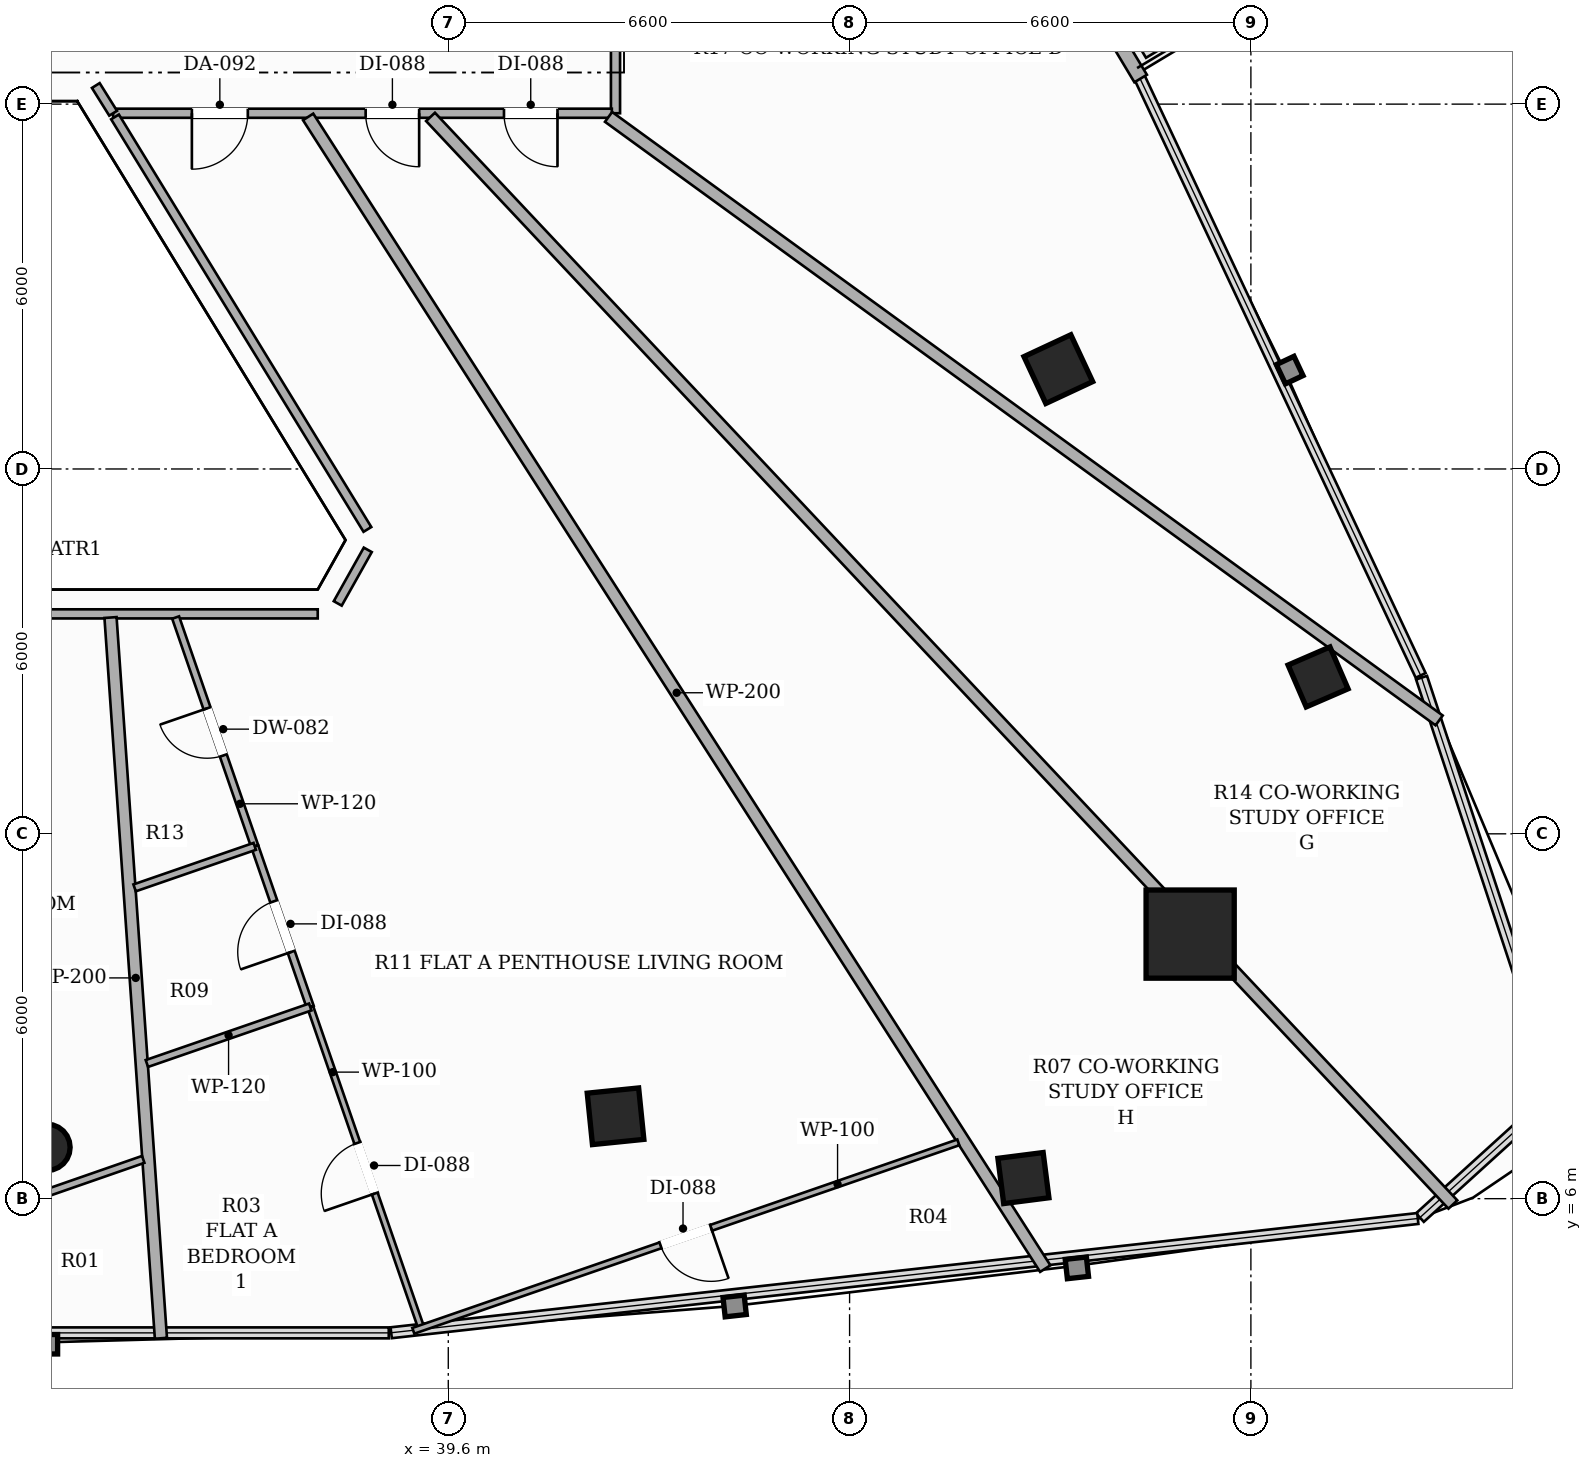
"""IFC4 building model, lengths in metres.
Left out: names, types, materials, properties, quantities, classifications, styles, units other than length and angle.
Written with IfcOpenShell. Run it as: python <this file> out.ifc"""

import sys

from ifc_helpers import new_model, si_unit, direction, frame, frame_2d, origin, origin_2d, place, context, subcontext, project, spatial, rectangle, hollow_rectangle, hollow_circle, extrude, element, fill, save


model = new_model("IFC4")
c1 = context("Model", 3, precision=1e-05, world=origin(), true_north=direction((0.0, 1.0)))
c2 = subcontext(c1, "Body", "Model", "MODEL_VIEW")
j1 = project(units=[si_unit("LENGTHUNIT", "METRE"), si_unit("PLANEANGLEUNIT", "RADIAN")], contexts=[c1])
p1 = place(None, origin())
s1 = spatial("IfcSite", under=j1, at=p1, CompositionType="ELEMENT")
p2 = place(p1, origin())
s2 = spatial("IfcBuilding", under=s1, at=p2, CompositionType="ELEMENT")
p3 = place(p2, frame((0.0, 0.0, 160.55)))
s3 = spatial("IfcBuildingStorey", under=s2, at=p3, CompositionType="ELEMENT", Elevation=160.55)
p4 = place(p3, frame((51.801, 10.351, 0.0), z_axis=(0.0, 0.0, 1.0), x_axis=(1.0, 0.0, 0.0)))
e1 = element("IfcColumn", 1, at=p4, inside=s3, PredefinedType="COLUMN", context=c2, shape_type="SweptSolid", body=[
    extrude(hollow_rectangle(XDim=1.45, YDim=1.45, WallThickness=0.045, at=origin_2d()), origin(), (0.0, 0.0, 1.0), 3.3),
])
p5 = place(p3, frame((33.0, 6.844, 0.0), z_axis=(0.0, 0.0, 1.0), x_axis=(1.0, 0.0, 0.0)))
e2 = element("IfcColumn", 2, at=p5, inside=s3, PredefinedType="COLUMN", context=c2, shape_type="SweptSolid", body=[
    extrude(hollow_circle(Radius=0.381, WallThickness=0.022, at=origin_2d()), origin(), (0.0, 0.0, 1.0), 3.3),
])
for number, where, z_axis, x_axis in (
    (3, (42.351, 7.355, 0.0), (0.0, 0.0, 1.0), (0.995, 0.101, 0.0)),
    (4, (49.633, 19.642, 0.0), (0.0, 0.0, 1.0), (-0.423, 0.906, 0.0)),
):
    element("IfcColumn", number, at=place(p3, frame(where, z_axis=z_axis, x_axis=x_axis)), inside=s3, PredefinedType="COLUMN", context=c2, shape_type="SweptSolid", body=[
        extrude(hollow_rectangle(XDim=0.85, YDim=0.85, WallThickness=0.028, at=origin_2d()), origin(), (0.0, 0.0, 1.0), 3.3),
    ])
for number, where, z_axis, x_axis in (
    (5, (49.059, 6.339, 0.0), (0.0, 0.0, 1.0), (0.992, 0.127, 0.0)),
    (6, (53.905, 14.58, 0.0), (0.0, 0.0, 1.0), (-0.397, 0.918, 0.0)),
):
    element("IfcColumn", number, at=place(p3, frame(where, z_axis=z_axis, x_axis=x_axis)), inside=s3, PredefinedType="COLUMN", context=c2, shape_type="SweptSolid", body=[
        extrude(hollow_rectangle(XDim=0.75, YDim=0.75, WallThickness=0.025, at=origin_2d()), origin(), (0.0, 0.0, 1.0), 3.3),
    ])
p6 = place(p3, frame((50.987, 24.421, 0.0), z_axis=(0.0, 0.0, 1.0), x_axis=(-0.514334017412, 0.85758994778, 0.0)))
e7 = element("IfcWall", 7, at=p6, inside=s3, PredefinedType="SOLIDWALL", context=c2, shape_type="SweptSolid", body=[
    extrude(rectangle(XDim=11.1, YDim=0.24, at=frame_2d((5.55, 0.0))), origin(), (0.0, 0.0, 1.0), 2.624),
])
p7 = place(p6, frame((8.602, 0.0, 0.0)))
e8 = element("IfcOpeningElement", 8, at=p7, cuts=e7, PredefinedType="OPENING", context=c2, shape_type="SweptSolid", body=[
    extrude(rectangle(XDim=1.8, YDim=2.2, at=frame_2d((0.9, 1.1))), frame((0.0, 0.13, 0.0), z_axis=(0.0, -1.0, 0.0), x_axis=(1.0, 0.0, 0.0)), (0.0, 0.0, 1.0), 0.26),
])
p8 = place(p3, frame((42.35, 28.34, 0.0), z_axis=(0.0, 0.0, 1.0), x_axis=(0.0, -1.0, 0.0)))
e9 = element("IfcWall", 9, at=p8, inside=s3, PredefinedType="PARTITIONING", context=c2, shape_type="SweptSolid", body=[
    extrude(rectangle(XDim=4.49, YDim=0.15, at=frame_2d((2.245, 0.0))), origin(), (0.0, 0.0, 1.0), 2.721),
])
p9 = place(p8, frame((1.805, 0.0, 0.0)))
e10 = element("IfcOpeningElement", 10, at=p9, cuts=e9, PredefinedType="OPENING", context=c2, shape_type="SweptSolid", body=[
    extrude(rectangle(XDim=0.88, YDim=2.1, at=frame_2d((0.44, 1.05))), frame((0.0, 0.085, 0.0), z_axis=(0.0, -1.0, 0.0), x_axis=(1.0, 0.0, 0.0)), (0.0, 0.0, 1.0), 0.17),
])
p10 = place(p3, frame((42.29, 23.85, 0.0), z_axis=(0.0, 0.0, 1.0), x_axis=(-1.0, 0.0, 0.0)))
e11 = element("IfcWall", 11, at=p10, inside=s3, PredefinedType="PARTITIONING", context=c2, shape_type="SweptSolid", body=[
    extrude(rectangle(XDim=8.202, YDim=0.15, at=frame_2d((4.101, 0.0))), origin(), (0.0, 0.0, 1.0), 2.492),
])
p11 = place(p10, frame((5.987, 0.0, 0.0)))
e12 = element("IfcOpeningElement", 12, at=p11, cuts=e11, PredefinedType="OPENING", context=c2, shape_type="SweptSolid", body=[
    extrude(rectangle(XDim=0.92, YDim=2.15, at=frame_2d((0.46, 1.075))), frame((0.0, 0.085, 0.0), z_axis=(0.0, -1.0, 0.0), x_axis=(1.0, 0.0, 0.0)), (0.0, 0.0, 1.0), 0.17),
])
p12 = place(p10, frame((0.894, 0.0, 0.0)))
e13 = element("IfcOpeningElement", 13, at=p12, cuts=e11, PredefinedType="OPENING", context=c2, shape_type="SweptSolid", body=[
    extrude(rectangle(XDim=0.88, YDim=2.1, at=frame_2d((0.44, 1.05))), frame((0.0, 0.085, 0.0), z_axis=(0.0, -1.0, 0.0), x_axis=(1.0, 0.0, 0.0)), (0.0, 0.0, 1.0), 0.17),
])
p13 = place(p10, frame((3.169, 0.0, 0.0)))
e14 = element("IfcOpeningElement", 14, at=p13, cuts=e11, PredefinedType="OPENING", context=c2, shape_type="SweptSolid", body=[
    extrude(rectangle(XDim=0.88, YDim=2.1, at=frame_2d((0.44, 1.05))), frame((0.0, 0.085, 0.0), z_axis=(0.0, -1.0, 0.0), x_axis=(1.0, 0.0, 0.0)), (0.0, 0.0, 1.0), 0.17),
])
p14 = place(p3, frame((34.088, 23.85, 0.0), z_axis=(0.0, 0.0, 1.0), x_axis=(-0.530039765459, 0.847972786728, 0.0)))
e15 = element("IfcWall", 15, at=p14, inside=s3, PredefinedType="PARTITIONING", context=c2, shape_type="SweptSolid", body=[
    extrude(rectangle(XDim=0.538, YDim=0.15, at=frame_2d((0.269, 0.0))), origin(), (0.0, 0.0, 1.0), 3.06),
])
p15 = place(p3, frame((34.119, 23.79, 0.0), z_axis=(0.0, 0.0, 1.0), x_axis=(0.521942869651, -0.852980445744, 0.0)))
e16 = element("IfcWall", 16, at=p15, inside=s3, PredefinedType="PARTITIONING", context=c2, shape_type="SweptSolid", body=[
    extrude(rectangle(XDim=7.953, YDim=0.15, at=frame_2d((3.977, 0.0))), origin(), (0.0, 0.0, 1.0), 2.721),
])
p16 = place(p3, frame((38.276, 16.67, 0.0), z_axis=(0.0, 0.0, 1.0), x_axis=(-0.489067077696, -0.872246177127, 0.0)))
e17 = element("IfcWall", 17, at=p16, inside=s3, PredefinedType="PARTITIONING", context=c2, shape_type="SweptSolid", body=[
    extrude(rectangle(XDim=1.01, YDim=0.15, at=frame_2d((0.505, 0.0))), origin(), (0.0, 0.0, 1.0), 3.06),
])
p17 = place(p3, frame((37.453, 15.617, 0.0), z_axis=(0.0, 0.0, 1.0), x_axis=(-1.0, 0.0, 0.0)))
e18 = element("IfcWall", 18, at=p17, inside=s3, PredefinedType="PARTITIONING", context=c2, shape_type="SweptSolid", body=[
    extrude(rectangle(XDim=8.906, YDim=0.15, at=frame_2d((4.453, 0.0))), origin(), (0.0, 0.0, 1.0), 2.721),
])
p18 = place(p3, frame((34.874, 3.704, 0.0), z_axis=(0.0, 0.0, 1.0), x_axis=(-0.069779440561, 0.997562443998, 0.0)))
e19 = element("IfcWall", 19, at=p18, inside=s3, PredefinedType="PARTITIONING", context=c2, shape_type="SweptSolid", body=[
    extrude(rectangle(XDim=11.882, YDim=0.2, at=frame_2d((5.941, 0.0))), origin(), (0.0, 0.0, 1.0), 2.413),
])
p19 = place(p3, frame((37.295, 23.79, 0.0), z_axis=(0.0, 0.0, 1.0), x_axis=(0.539100523601, -0.842241429433, 0.0)))
e20 = element("IfcWall", 20, at=p19, inside=s3, PredefinedType="PARTITIONING", context=c2, shape_type="SweptSolid", body=[
    extrude(rectangle(XDim=22.488, YDim=0.2, at=frame_2d((11.244, 0.0))), origin(), (0.0, 0.0, 1.0), 2.413),
])
p20 = place(p3, frame((55.896, 13.865, 0.0), z_axis=(0.0, 0.0, 1.0), x_axis=(-0.809001736781, 0.587806251995, 0.0)))
e21 = element("IfcWall", 21, at=p20, inside=s3, PredefinedType="PARTITIONING", context=c2, shape_type="SweptSolid", body=[
    extrude(rectangle(XDim=16.885, YDim=0.2, at=frame_2d((8.442, 0.0))), origin(), (0.0, 0.0, 1.0), 2.413),
])
p21 = place(p3, frame((56.122, 5.904, 0.0), z_axis=(0.0, 0.0, 1.0), x_axis=(-0.684934612975, 0.728604540165, 0.0)))
e22 = element("IfcWall", 22, at=p21, inside=s3, PredefinedType="PARTITIONING", context=c2, shape_type="SweptSolid", body=[
    extrude(rectangle(XDim=24.548, YDim=0.2, at=frame_2d((12.274, 0.0))), origin(), (0.0, 0.0, 1.0), 2.413),
])
p22 = place(p3, frame((36.417, 11.794, 0.0), z_axis=(0.0, 0.0, 1.0), x_axis=(-0.326767254884, 0.945104841346, 0.0)))
e23 = element("IfcWall", 23, at=p22, inside=s3, PredefinedType="PARTITIONING", context=c2, shape_type="SweptSolid", body=[
    extrude(rectangle(XDim=3.981, YDim=0.12, at=frame_2d((1.991, 0.0))), origin(), (0.0, 0.0, 1.0), 3.06),
])
p23 = place(p22, frame((1.581, 0.0, 0.0)))
e24 = element("IfcOpeningElement", 24, at=p23, cuts=e23, PredefinedType="OPENING", context=c2, shape_type="SweptSolid", body=[
    extrude(rectangle(XDim=0.82, YDim=2.1, at=frame_2d((0.41, 1.05))), frame((0.0, 0.07, 0.0), z_axis=(0.0, -1.0, 0.0), x_axis=(1.0, 0.0, 0.0)), (0.0, 0.0, 1.0), 0.14),
])
p24 = place(p3, frame((37.33, 9.152, 0.0), z_axis=(0.0, 0.0, 1.0), x_axis=(-0.326663542442, 0.945140693251, 0.0)))
e25 = element("IfcWall", 25, at=p24, inside=s3, PredefinedType="PARTITIONING", context=c2, shape_type="SweptSolid", body=[
    extrude(rectangle(XDim=2.795, YDim=0.12, at=frame_2d((1.397, 0.0))), origin(), (0.0, 0.0, 1.0), 2.721),
])
p25 = place(p24, frame((0.958, 0.0, 0.0)))
e26 = element("IfcOpeningElement", 26, at=p25, cuts=e25, PredefinedType="OPENING", context=c2, shape_type="SweptSolid", body=[
    extrude(rectangle(XDim=0.88, YDim=2.1, at=frame_2d((0.44, 1.05))), frame((0.0, 0.07, 0.0), z_axis=(0.0, -1.0, 0.0), x_axis=(1.0, 0.0, 0.0)), (0.0, 0.0, 1.0), 0.14),
])
p26 = place(p3, frame((39.164, 3.848, 0.0), z_axis=(0.0, 0.0, 1.0), x_axis=(-0.326778856457, 0.945100830056, 0.0)))
e27 = element("IfcWall", 27, at=p26, inside=s3, PredefinedType="PARTITIONING", context=c2, shape_type="SweptSolid", body=[
    extrude(rectangle(XDim=5.612, YDim=0.1, at=frame_2d((2.806, 0.0))), origin(), (0.0, 0.0, 1.0), 2.413),
])
p27 = place(p26, frame((2.366, 0.0, 0.0)))
e28 = element("IfcOpeningElement", 28, at=p27, cuts=e27, PredefinedType="OPENING", context=c2, shape_type="SweptSolid", body=[
    extrude(rectangle(XDim=0.88, YDim=2.1, at=frame_2d((0.44, 1.05))), frame((0.0, 0.06, 0.0), z_axis=(0.0, -1.0, 0.0), x_axis=(1.0, 0.0, 0.0)), (0.0, 0.0, 1.0), 0.12),
])
p28 = place(p3, frame((47.988, 6.926, 0.0), z_axis=(0.0, 0.0, 1.0), x_axis=(-0.945100175753, -0.326780748809, 0.0)))
e29 = element("IfcWall", 29, at=p28, inside=s3, PredefinedType="PARTITIONING", context=c2, shape_type="SweptSolid", body=[
    extrude(rectangle(XDim=9.484, YDim=0.1, at=frame_2d((4.742, 0.0))), origin(), (0.0, 0.0, 1.0), 2.413),
])
p29 = place(p28, frame((4.302, 0.0, 0.0)))
e30 = element("IfcOpeningElement", 30, at=p29, cuts=e29, PredefinedType="OPENING", context=c2, shape_type="SweptSolid", body=[
    extrude(rectangle(XDim=0.88, YDim=2.1, at=frame_2d((0.44, 1.05))), frame((0.0, 0.06, 0.0), z_axis=(0.0, -1.0, 0.0), x_axis=(1.0, 0.0, 0.0)), (0.0, 0.0, 1.0), 0.12),
])
p30 = place(p3, frame((36.417, 11.794, 0.0), z_axis=(0.0, 0.0, 1.0), x_axis=(-0.945158093584, -0.326613193446, 0.0)))
e31 = element("IfcWall", 31, at=p30, inside=s3, PredefinedType="PARTITIONING", context=c2, shape_type="SweptSolid", body=[
    extrude(rectangle(XDim=2.091, YDim=0.12, at=frame_2d((1.045, 0.0))), origin(), (0.0, 0.0, 1.0), 3.06),
])
p31 = place(p3, frame((37.33, 9.152, 0.0), z_axis=(0.0, 0.0, 1.0), x_axis=(-0.945086078656, -0.326821516933, 0.0)))
e32 = element("IfcWall", 32, at=p31, inside=s3, PredefinedType="PARTITIONING", context=c2, shape_type="SweptSolid", body=[
    extrude(rectangle(XDim=2.843, YDim=0.12, at=frame_2d((1.422, 0.0))), origin(), (0.0, 0.0, 1.0), 2.721),
])
p32 = place(p3, frame((34.583, 6.646, 0.0), z_axis=(0.0, 0.0, 1.0), x_axis=(-0.944539899325, -0.328396678704, 0.0)))
e33 = element("IfcWall", 33, at=p32, inside=s3, PredefinedType="PARTITIONING", context=c2, shape_type="SweptSolid", body=[
    extrude(rectangle(XDim=8.48, YDim=0.12, at=frame_2d((4.24, 0.0))), origin(), (0.0, 0.0, 1.0), 2.413),
])
p33 = place(p32, frame((3.83, 0.0, 0.0)))
e34 = element("IfcOpeningElement", 34, at=p33, cuts=e33, PredefinedType="OPENING", context=c2, shape_type="SweptSolid", body=[
    extrude(rectangle(XDim=0.82, YDim=2.1, at=frame_2d((0.41, 1.05))), frame((0.0, 0.07, 0.0), z_axis=(0.0, -1.0, 0.0), x_axis=(1.0, 0.0, 0.0)), (0.0, 0.0, 1.0), 0.14),
])
p34 = place(p11, origin())
e35 = element("IfcDoor", 35, at=p34, inside=s3, OperationType="SINGLE_SWING_RIGHT", PredefinedType="DOOR", context=c2, shape_type="SweptSolid", body=[
    extrude(rectangle(XDim=0.92, YDim=2.15, at=frame_2d((0.46, 1.075))), frame((0.0, 0.025, 0.0), z_axis=(0.0, -1.0, 0.0), x_axis=(1.0, 0.0, 0.0)), (0.0, 0.0, 1.0), 0.05),
])
fill(e12, e35)
p35 = place(p23, origin())
e36 = element("IfcDoor", 36, at=p35, inside=s3, OperationType="SINGLE_SWING_RIGHT", PredefinedType="DOOR", context=c2, shape_type="SweptSolid", body=[
    extrude(rectangle(XDim=0.82, YDim=2.1, at=frame_2d((0.41, 1.05))), frame((0.0, 0.025, 0.0), z_axis=(0.0, -1.0, 0.0), x_axis=(1.0, 0.0, 0.0)), (0.0, 0.0, 1.0), 0.05),
])
fill(e24, e36)
p36 = place(p25, origin())
e37 = element("IfcDoor", 37, at=p36, inside=s3, OperationType="SINGLE_SWING_LEFT", PredefinedType="DOOR", context=c2, shape_type="SweptSolid", body=[
    extrude(rectangle(XDim=0.88, YDim=2.1, at=frame_2d((0.44, 1.05))), frame((0.0, 0.025, 0.0), z_axis=(0.0, -1.0, 0.0), x_axis=(1.0, 0.0, 0.0)), (0.0, 0.0, 1.0), 0.05),
])
fill(e26, e37)
p37 = place(p27, origin())
e38 = element("IfcDoor", 38, at=p37, inside=s3, OperationType="SINGLE_SWING_LEFT", PredefinedType="DOOR", context=c2, shape_type="SweptSolid", body=[
    extrude(rectangle(XDim=0.88, YDim=2.1, at=frame_2d((0.44, 1.05))), frame((0.0, 0.025, 0.0), z_axis=(0.0, -1.0, 0.0), x_axis=(1.0, 0.0, 0.0)), (0.0, 0.0, 1.0), 0.05),
])
fill(e28, e38)
p38 = place(p29, origin())
e39 = element("IfcDoor", 39, at=p38, inside=s3, OperationType="SINGLE_SWING_LEFT", PredefinedType="DOOR", context=c2, shape_type="SweptSolid", body=[
    extrude(rectangle(XDim=0.88, YDim=2.1, at=frame_2d((0.44, 1.05))), frame((0.0, 0.025, 0.0), z_axis=(0.0, -1.0, 0.0), x_axis=(1.0, 0.0, 0.0)), (0.0, 0.0, 1.0), 0.05),
])
fill(e30, e39)
p39 = place(p12, origin())
e40 = element("IfcDoor", 40, at=p39, inside=s3, OperationType="SINGLE_SWING_LEFT", PredefinedType="DOOR", context=c2, shape_type="SweptSolid", body=[
    extrude(rectangle(XDim=0.88, YDim=2.1, at=frame_2d((0.44, 1.05))), frame((0.0, 0.025, 0.0), z_axis=(0.0, -1.0, 0.0), x_axis=(1.0, 0.0, 0.0)), (0.0, 0.0, 1.0), 0.05),
])
fill(e13, e40)
p40 = place(p13, origin())
e41 = element("IfcDoor", 41, at=p40, inside=s3, OperationType="SINGLE_SWING_LEFT", PredefinedType="DOOR", context=c2, shape_type="SweptSolid", body=[
    extrude(rectangle(XDim=0.88, YDim=2.1, at=frame_2d((0.44, 1.05))), frame((0.0, 0.025, 0.0), z_axis=(0.0, -1.0, 0.0), x_axis=(1.0, 0.0, 0.0)), (0.0, 0.0, 1.0), 0.05),
])
fill(e14, e41)
save(model, sys.argv[1])
